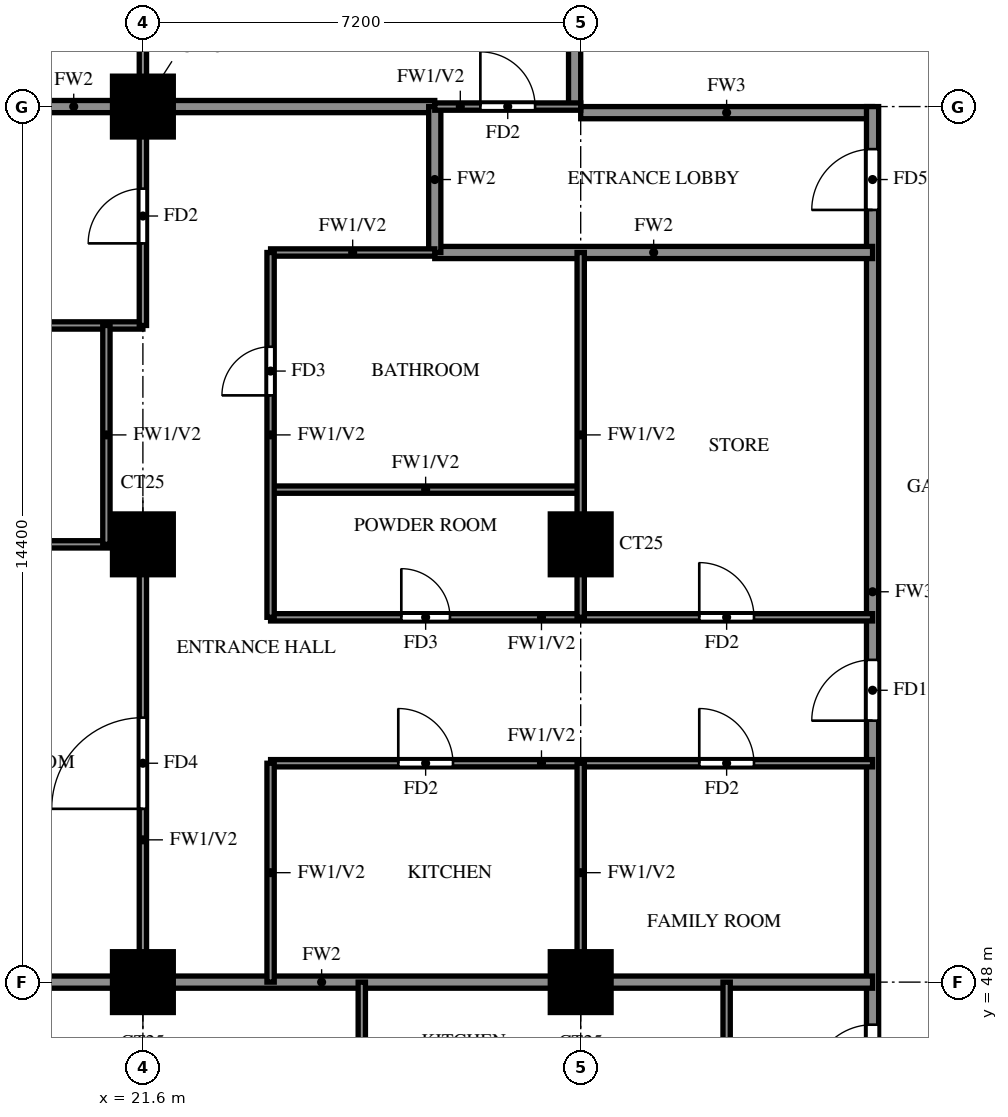
"""IFC4 building model, lengths in metres.
Left out: names, types, materials, properties, quantities, classifications, styles, units other than length and angle.
Written with IfcOpenShell. Run it as: python <this file> out.ifc"""

import sys

from ifc_helpers import new_model, si_unit, direction, frame, frame_2d, origin, origin_2d, place, context, subcontext, project, spatial, rectangle, extrude, source, transform, mapped, element, fill, save


model = new_model("IFC4")
c1 = context("Model", 3, precision=1e-05, world=origin(), true_north=direction((0.0, 1.0)))
c2 = subcontext(c1, "Body", "Model", "MODEL_VIEW")
j1 = project(units=[si_unit("LENGTHUNIT", "METRE"), si_unit("PLANEANGLEUNIT", "RADIAN")], contexts=[c1])
p1 = place(None, origin())
s1 = spatial("IfcSite", under=j1, at=p1, CompositionType="ELEMENT")
p2 = place(p1, origin())
s2 = spatial("IfcBuilding", under=s1, at=p2, CompositionType="ELEMENT")
p3 = place(p2, frame((0.0, 0.0, 150.0)))
s3 = spatial("IfcBuildingStorey", under=s2, at=p3, CompositionType="ELEMENT", Elevation=150.0)
m1 = source(origin(), c2, "Body", "SweptSolid", [
    extrude(rectangle(XDim=1.0, YDim=1.0, at=origin_2d()), origin(), (0.0, 0.0, 1.0), 3.2),
])
for number, where, z_axis, x_axis in (
    (1, (21.6, 48.0, 0.0), (0.0, 0.0, 1.0), (1.0, 0.0, 0.0)),
    (2, (28.8, 48.0, 0.0), (0.0, 0.0, 1.0), (1.0, 0.0, 0.0)),
    (3, (21.6, 55.2, 0.0), (0.0, 0.0, 1.0), (1.0, 0.0, 0.0)),
    (4, (28.8, 55.2, 0.0), (0.0, 0.0, 1.0), (1.0, 0.0, 0.0)),
    (5, (21.6, 62.4, 0.0), (0.0, 0.0, 1.0), (1.0, 0.0, 0.0)),
):
    element("IfcColumn", number, at=place(p3, frame(where, z_axis=z_axis, x_axis=x_axis)), inside=s3, PredefinedType="COLUMN", context=c2, shape_type="MappedRepresentation", body=[
        mapped(m1, transform((0.0, 0.0, 0.0))),
    ])
p4 = place(p3, frame((28.8, 62.3, 0.0), z_axis=(0.0, 0.0, 1.0), x_axis=(1.0, 0.0, 0.0)))
e6 = element("IfcWall", 6, at=p4, inside=s3, PredefinedType="SOLIDWALL", context=c2, shape_type="SweptSolid", body=[
    extrude(rectangle(XDim=4.8, YDim=0.2, at=frame_2d((2.4, 0.0))), origin(), (0.0, 0.0, 1.0), 3.2),
])
p5 = place(p3, frame((28.7, 62.4, 0.0), z_axis=(0.0, 0.0, 1.0), x_axis=(0.0, 1.0, 0.0)))
e7 = element("IfcWall", 7, at=p5, inside=s3, PredefinedType="SOLIDWALL", context=c2, shape_type="SweptSolid", body=[
    extrude(rectangle(XDim=15.6, YDim=0.2, at=frame_2d((7.8, 0.0))), origin(), (0.0, 0.0, 1.0), 3.2),
])
p6 = place(p3, frame((33.6, 45.6, 0.0), z_axis=(0.0, 0.0, 1.0), x_axis=(0.0, 1.0, 0.0)))
e8 = element("IfcWall", 8, at=p6, inside=s3, PredefinedType="SOLIDWALL", context=c2, shape_type="SweptSolid", body=[
    extrude(rectangle(XDim=16.8, YDim=0.2, at=frame_2d((8.4, 0.0))), origin(), (0.0, 0.0, 1.0), 3.2),
])
p7 = place(p6, frame((0.7, 0.0, 0.0)))
e9 = element("IfcOpeningElement", 9, at=p7, cuts=e8, PredefinedType="OPENING", context=c2, shape_type="SweptSolid", body=[
    extrude(rectangle(XDim=1.0, YDim=2.1, at=frame_2d((0.5, 1.05))), frame((0.0, 0.11, 0.0), z_axis=(0.0, -1.0, 0.0), x_axis=(1.0, 0.0, 0.0)), (0.0, 0.0, 1.0), 0.22),
])
p8 = place(p6, frame((6.7, 0.0, 0.0)))
e10 = element("IfcOpeningElement", 10, at=p8, cuts=e8, PredefinedType="OPENING", context=c2, shape_type="SweptSolid", body=[
    extrude(rectangle(XDim=1.0, YDim=2.1, at=frame_2d((0.5, 1.05))), frame((0.0, 0.11, 0.0), z_axis=(0.0, -1.0, 0.0), x_axis=(1.0, 0.0, 0.0)), (0.0, 0.0, 1.0), 0.22),
])
p9 = place(p6, frame((15.1, 0.0, 0.0)))
e11 = element("IfcOpeningElement", 11, at=p9, cuts=e8, PredefinedType="OPENING", context=c2, shape_type="SweptSolid", body=[
    extrude(rectangle(XDim=1.0, YDim=2.1, at=frame_2d((0.5, 1.05))), frame((0.0, 0.11, 0.0), z_axis=(0.0, -1.0, 0.0), x_axis=(1.0, 0.0, 0.0)), (0.0, 0.0, 1.0), 0.22),
])
p10 = place(p3, frame((14.525, 48.0, 0.0), z_axis=(0.0, 0.0, 1.0), x_axis=(1.0, 0.0, 0.0)))
e12 = element("IfcWall", 12, at=p10, inside=s3, PredefinedType="SOLIDWALL", context=c2, shape_type="SweptSolid", body=[
    extrude(rectangle(XDim=19.075, YDim=0.2, at=frame_2d((9.538, 0.0))), origin(), (0.0, 0.0, 1.0), 3.2),
])
p11 = place(p3, frame((26.4, 60.0, 0.0), z_axis=(0.0, 0.0, 1.0), x_axis=(1.0, 0.0, 0.0)))
e13 = element("IfcWall", 13, at=p11, inside=s3, PredefinedType="SOLIDWALL", context=c2, shape_type="SweptSolid", body=[
    extrude(rectangle(XDim=7.2, YDim=0.2, at=frame_2d((3.6, 0.0))), origin(), (0.0, 0.0, 1.0), 3.2),
])
p12 = place(p3, frame((14.525, 62.4, 0.0), z_axis=(0.0, 0.0, 1.0), x_axis=(1.0, 0.0, 0.0)))
e14 = element("IfcWall", 14, at=p12, inside=s3, PredefinedType="SOLIDWALL", context=c2, shape_type="SweptSolid", body=[
    extrude(rectangle(XDim=11.875, YDim=0.2, at=frame_2d((5.938, 0.0))), origin(), (0.0, 0.0, 1.0), 3.2),
])
p13 = place(p3, frame((26.4, 60.0, 0.0), z_axis=(0.0, 0.0, 1.0), x_axis=(0.0, 1.0, 0.0)))
e15 = element("IfcWall", 15, at=p13, inside=s3, PredefinedType="SOLIDWALL", context=c2, shape_type="SweptSolid", body=[
    extrude(rectangle(XDim=2.4, YDim=0.2, at=frame_2d((1.2, 0.0))), origin(), (0.0, 0.0, 1.0), 3.2),
])
p14 = place(p3, frame((23.7, 51.6, 0.0), z_axis=(0.0, 0.0, 1.0), x_axis=(1.0, 0.0, 0.0)))
e16 = element("IfcWall", 16, at=p14, inside=s3, PredefinedType="PARTITIONING", context=c2, shape_type="SweptSolid", body=[
    extrude(rectangle(XDim=9.9, YDim=0.12, at=frame_2d((4.95, 0.0))), origin(), (0.0, 0.0, 1.0), 3.2),
])
p15 = place(p14, frame((2.1, 0.0, 0.0)))
e17 = element("IfcOpeningElement", 17, at=p15, cuts=e16, PredefinedType="OPENING", context=c2, shape_type="SweptSolid", body=[
    extrude(rectangle(XDim=0.9, YDim=2.1, at=frame_2d((0.45, 1.05))), frame((0.0, 0.07, 0.0), z_axis=(0.0, -1.0, 0.0), x_axis=(1.0, 0.0, 0.0)), (0.0, 0.0, 1.0), 0.14),
])
p16 = place(p14, frame((7.05, 0.0, 0.0)))
e18 = element("IfcOpeningElement", 18, at=p16, cuts=e16, PredefinedType="OPENING", context=c2, shape_type="SweptSolid", body=[
    extrude(rectangle(XDim=0.9, YDim=2.1, at=frame_2d((0.45, 1.05))), frame((0.0, 0.07, 0.0), z_axis=(0.0, -1.0, 0.0), x_axis=(1.0, 0.0, 0.0)), (0.0, 0.0, 1.0), 0.14),
])
p17 = place(p3, frame((23.7, 54.0, 0.0), z_axis=(0.0, 0.0, 1.0), x_axis=(1.0, 0.0, 0.0)))
e19 = element("IfcWall", 19, at=p17, inside=s3, PredefinedType="PARTITIONING", context=c2, shape_type="SweptSolid", body=[
    extrude(rectangle(XDim=9.9, YDim=0.12, at=frame_2d((4.95, 0.0))), origin(), (0.0, 0.0, 1.0), 3.2),
])
p18 = place(p17, frame((2.15, 0.0, 0.0)))
e20 = element("IfcOpeningElement", 20, at=p18, cuts=e19, PredefinedType="OPENING", context=c2, shape_type="SweptSolid", body=[
    extrude(rectangle(XDim=0.8, YDim=2.1, at=frame_2d((0.4, 1.05))), frame((0.0, 0.07, 0.0), z_axis=(0.0, -1.0, 0.0), x_axis=(1.0, 0.0, 0.0)), (0.0, 0.0, 1.0), 0.14),
])
p19 = place(p17, frame((7.05, 0.0, 0.0)))
e21 = element("IfcOpeningElement", 21, at=p19, cuts=e19, PredefinedType="OPENING", context=c2, shape_type="SweptSolid", body=[
    extrude(rectangle(XDim=0.9, YDim=2.1, at=frame_2d((0.45, 1.05))), frame((0.0, 0.07, 0.0), z_axis=(0.0, -1.0, 0.0), x_axis=(1.0, 0.0, 0.0)), (0.0, 0.0, 1.0), 0.14),
])
p20 = place(p3, frame((14.525, 55.2, 0.0), z_axis=(0.0, 0.0, 1.0), x_axis=(1.0, 0.0, 0.0)))
e22 = element("IfcWall", 22, at=p20, inside=s3, PredefinedType="PARTITIONING", context=c2, shape_type="SweptSolid", body=[
    extrude(rectangle(XDim=7.075, YDim=0.12, at=frame_2d((3.538, 0.0))), origin(), (0.0, 0.0, 1.0), 3.2),
])
p21 = place(p3, frame((23.7, 56.1, 0.0), z_axis=(0.0, 0.0, 1.0), x_axis=(1.0, 0.0, 0.0)))
e23 = element("IfcWall", 23, at=p21, inside=s3, PredefinedType="PARTITIONING", context=c2, shape_type="SweptSolid", body=[
    extrude(rectangle(XDim=5.1, YDim=0.12, at=frame_2d((2.55, 0.0))), origin(), (0.0, 0.0, 1.0), 3.2),
])
p22 = place(p3, frame((14.525, 58.8, 0.0), z_axis=(0.0, 0.0, 1.0), x_axis=(1.0, 0.0, 0.0)))
e24 = element("IfcWall", 24, at=p22, inside=s3, PredefinedType="PARTITIONING", context=c2, shape_type="SweptSolid", body=[
    extrude(rectangle(XDim=7.075, YDim=0.12, at=frame_2d((3.538, 0.0))), origin(), (0.0, 0.0, 1.0), 2.3),
])
p23 = place(p22, frame((2.837, 0.0, 0.0)))
e25 = element("IfcOpeningElement", 25, at=p23, cuts=e24, PredefinedType="OPENING", context=c2, shape_type="SweptSolid", body=[
    extrude(rectangle(XDim=0.8, YDim=2.1, at=frame_2d((0.4, 1.05))), frame((0.0, 0.07, 0.0), z_axis=(0.0, -1.0, 0.0), x_axis=(1.0, 0.0, 0.0)), (0.0, 0.0, 1.0), 0.14),
])
p24 = place(p3, frame((23.7, 60.0, 0.0), z_axis=(0.0, 0.0, 1.0), x_axis=(1.0, 0.0, 0.0)))
e26 = element("IfcWall", 26, at=p24, inside=s3, PredefinedType="PARTITIONING", context=c2, shape_type="SweptSolid", body=[
    extrude(rectangle(XDim=2.7, YDim=0.12, at=frame_2d((1.35, 0.0))), origin(), (0.0, 0.0, 1.0), 3.2),
])
p25 = place(p3, frame((26.4, 62.4, 0.0), z_axis=(0.0, 0.0, 1.0), x_axis=(1.0, 0.0, 0.0)))
e27 = element("IfcWall", 27, at=p25, inside=s3, PredefinedType="PARTITIONING", context=c2, shape_type="SweptSolid", body=[
    extrude(rectangle(XDim=2.4, YDim=0.12, at=frame_2d((1.2, 0.0))), origin(), (0.0, 0.0, 1.0), 3.2),
])
p26 = place(p25, frame((0.75, 0.0, 0.0)))
e28 = element("IfcOpeningElement", 28, at=p26, cuts=e27, PredefinedType="OPENING", context=c2, shape_type="SweptSolid", body=[
    extrude(rectangle(XDim=0.9, YDim=2.1, at=frame_2d((0.45, 1.05))), frame((0.0, 0.07, 0.0), z_axis=(0.0, -1.0, 0.0), x_axis=(1.0, 0.0, 0.0)), (0.0, 0.0, 1.0), 0.14),
])
p27 = place(p3, frame((21.0, 55.2, 0.0), z_axis=(0.0, 0.0, 1.0), x_axis=(0.0, 1.0, 0.0)))
e29 = element("IfcWall", 29, at=p27, inside=s3, PredefinedType="PARTITIONING", context=c2, shape_type="SweptSolid", body=[
    extrude(rectangle(XDim=3.6, YDim=0.12, at=frame_2d((1.8, 0.0))), origin(), (0.0, 0.0, 1.0), 3.2),
])
p28 = place(p3, frame((21.6, 48.0, 0.0), z_axis=(0.0, 0.0, 1.0), x_axis=(0.0, 1.0, 0.0)))
e30 = element("IfcWall", 30, at=p28, inside=s3, PredefinedType="PARTITIONING", context=c2, shape_type="SweptSolid", body=[
    extrude(rectangle(XDim=7.2, YDim=0.12, at=frame_2d((3.6, 0.0))), origin(), (0.0, 0.0, 1.0), 3.2),
])
p29 = place(p28, frame((2.85, 0.0, 0.0)))
e31 = element("IfcOpeningElement", 31, at=p29, cuts=e30, PredefinedType="OPENING", context=c2, shape_type="SweptSolid", body=[
    extrude(rectangle(XDim=1.5, YDim=2.1, at=frame_2d((0.75, 1.05))), frame((0.0, 0.07, 0.0), z_axis=(0.0, -1.0, 0.0), x_axis=(1.0, 0.0, 0.0)), (0.0, 0.0, 1.0), 0.14),
])
p30 = place(p3, frame((21.6, 58.8, 0.0), z_axis=(0.0, 0.0, 1.0), x_axis=(0.0, 1.0, 0.0)))
e32 = element("IfcWall", 32, at=p30, inside=s3, PredefinedType="PARTITIONING", context=c2, shape_type="SweptSolid", body=[
    extrude(rectangle(XDim=10.8, YDim=0.12, at=frame_2d((5.4, 0.0))), origin(), (0.0, 0.0, 1.0), 3.2),
])
p31 = place(p30, frame((1.35, 0.0, 0.0)))
e33 = element("IfcOpeningElement", 33, at=p31, cuts=e32, PredefinedType="OPENING", context=c2, shape_type="SweptSolid", body=[
    extrude(rectangle(XDim=0.9, YDim=2.1, at=frame_2d((0.45, 1.05))), frame((0.0, 0.07, 0.0), z_axis=(0.0, -1.0, 0.0), x_axis=(1.0, 0.0, 0.0)), (0.0, 0.0, 1.0), 0.14),
])
p32 = place(p30, frame((4.95, 0.0, 0.0)))
e34 = element("IfcOpeningElement", 34, at=p32, cuts=e32, PredefinedType="OPENING", context=c2, shape_type="SweptSolid", body=[
    extrude(rectangle(XDim=0.9, YDim=2.1, at=frame_2d((0.45, 1.05))), frame((0.0, 0.07, 0.0), z_axis=(0.0, -1.0, 0.0), x_axis=(1.0, 0.0, 0.0)), (0.0, 0.0, 1.0), 0.14),
])
p33 = place(p30, frame((8.55, 0.0, 0.0)))
e35 = element("IfcOpeningElement", 35, at=p33, cuts=e32, PredefinedType="OPENING", context=c2, shape_type="SweptSolid", body=[
    extrude(rectangle(XDim=0.9, YDim=2.1, at=frame_2d((0.45, 1.05))), frame((0.0, 0.07, 0.0), z_axis=(0.0, -1.0, 0.0), x_axis=(1.0, 0.0, 0.0)), (0.0, 0.0, 1.0), 0.14),
])
p34 = place(p3, frame((23.7, 48.0, 0.0), z_axis=(0.0, 0.0, 1.0), x_axis=(0.0, 1.0, 0.0)))
e36 = element("IfcWall", 36, at=p34, inside=s3, PredefinedType="PARTITIONING", context=c2, shape_type="SweptSolid", body=[
    extrude(rectangle(XDim=3.6, YDim=0.12, at=frame_2d((1.8, 0.0))), origin(), (0.0, 0.0, 1.0), 3.2),
])
p35 = place(p3, frame((23.7, 54.0, 0.0), z_axis=(0.0, 0.0, 1.0), x_axis=(0.0, 1.0, 0.0)))
e37 = element("IfcWall", 37, at=p35, inside=s3, PredefinedType="PARTITIONING", context=c2, shape_type="SweptSolid", body=[
    extrude(rectangle(XDim=6.0, YDim=0.12, at=frame_2d((3.0, 0.0))), origin(), (0.0, 0.0, 1.0), 3.2),
])
p36 = place(p35, frame((3.65, 0.0, 0.0)))
e38 = element("IfcOpeningElement", 38, at=p36, cuts=e37, PredefinedType="OPENING", context=c2, shape_type="SweptSolid", body=[
    extrude(rectangle(XDim=0.8, YDim=2.1, at=frame_2d((0.4, 1.05))), frame((0.0, 0.07, 0.0), z_axis=(0.0, -1.0, 0.0), x_axis=(1.0, 0.0, 0.0)), (0.0, 0.0, 1.0), 0.14),
])
p37 = place(p3, frame((25.2, 39.725, 0.0), z_axis=(0.0, 0.0, 1.0), x_axis=(0.0, 1.0, 0.0)))
e39 = element("IfcWall", 39, at=p37, inside=s3, PredefinedType="PARTITIONING", context=c2, shape_type="SweptSolid", body=[
    extrude(rectangle(XDim=8.275, YDim=0.12, at=frame_2d((4.137, 0.0))), origin(), (0.0, 0.0, 1.0), 3.2),
])
p38 = place(p37, frame((4.525, 0.0, 0.0)))
e40 = element("IfcOpeningElement", 40, at=p38, cuts=e39, PredefinedType="OPENING", context=c2, shape_type="SweptSolid", body=[
    extrude(rectangle(XDim=0.9, YDim=2.1, at=frame_2d((0.45, 1.05))), frame((0.0, 0.07, 0.0), z_axis=(0.0, -1.0, 0.0), x_axis=(1.0, 0.0, 0.0)), (0.0, 0.0, 1.0), 0.14),
])
p39 = place(p3, frame((28.8, 48.0, 0.0), z_axis=(0.0, 0.0, 1.0), x_axis=(0.0, 1.0, 0.0)))
e41 = element("IfcWall", 41, at=p39, inside=s3, PredefinedType="PARTITIONING", context=c2, shape_type="SweptSolid", body=[
    extrude(rectangle(XDim=3.6, YDim=0.12, at=frame_2d((1.8, 0.0))), origin(), (0.0, 0.0, 1.0), 3.2),
])
p40 = place(p3, frame((28.8, 54.0, 0.0), z_axis=(0.0, 0.0, 1.0), x_axis=(0.0, 1.0, 0.0)))
e42 = element("IfcWall", 42, at=p40, inside=s3, PredefinedType="PARTITIONING", context=c2, shape_type="SweptSolid", body=[
    extrude(rectangle(XDim=6.0, YDim=0.12, at=frame_2d((3.0, 0.0))), origin(), (0.0, 0.0, 1.0), 3.2),
])
p41 = place(p3, frame((31.2, 45.6, 0.0), z_axis=(0.0, 0.0, 1.0), x_axis=(0.0, 1.0, 0.0)))
e43 = element("IfcWall", 43, at=p41, inside=s3, PredefinedType="PARTITIONING", context=c2, shape_type="SweptSolid", body=[
    extrude(rectangle(XDim=2.4, YDim=0.12, at=frame_2d((1.2, 0.0))), origin(), (0.0, 0.0, 1.0), 3.2),
])
p42 = place(p7, origin())
e44 = element("IfcDoor", 44, at=p42, inside=s3, OperationType="SINGLE_SWING_RIGHT", PredefinedType="DOOR", context=c2, shape_type="SweptSolid", body=[
    extrude(rectangle(XDim=1.0, YDim=2.1, at=frame_2d((0.5, 1.05))), frame((0.0, 0.025, 0.0), z_axis=(0.0, -1.0, 0.0), x_axis=(1.0, 0.0, 0.0)), (0.0, 0.0, 1.0), 0.05),
])
fill(e9, e44)
p43 = place(p8, origin())
e45 = element("IfcDoor", 45, at=p43, inside=s3, OperationType="SINGLE_SWING_RIGHT", PredefinedType="DOOR", context=c2, shape_type="SweptSolid", body=[
    extrude(rectangle(XDim=1.0, YDim=2.1, at=frame_2d((0.5, 1.05))), frame((0.0, 0.025, 0.0), z_axis=(0.0, -1.0, 0.0), x_axis=(1.0, 0.0, 0.0)), (0.0, 0.0, 1.0), 0.05),
])
fill(e10, e45)
p44 = place(p29, origin())
e46 = element("IfcDoor", 46, at=p44, inside=s3, OperationType="SINGLE_SWING_LEFT", PredefinedType="DOOR", context=c2, shape_type="SweptSolid", body=[
    extrude(rectangle(XDim=1.5, YDim=2.1, at=frame_2d((0.75, 1.05))), frame((0.0, 0.025, 0.0), z_axis=(0.0, -1.0, 0.0), x_axis=(1.0, 0.0, 0.0)), (0.0, 0.0, 1.0), 0.05),
])
fill(e31, e46)
p45 = place(p31, origin())
e47 = element("IfcDoor", 47, at=p45, inside=s3, OperationType="SINGLE_SWING_LEFT", PredefinedType="DOOR", context=c2, shape_type="SweptSolid", body=[
    extrude(rectangle(XDim=0.9, YDim=2.1, at=frame_2d((0.45, 1.05))), frame((0.0, 0.025, 0.0), z_axis=(0.0, -1.0, 0.0), x_axis=(1.0, 0.0, 0.0)), (0.0, 0.0, 1.0), 0.05),
])
fill(e33, e47)
p46 = place(p15, origin())
e48 = element("IfcDoor", 48, at=p46, inside=s3, OperationType="SINGLE_SWING_LEFT", PredefinedType="DOOR", context=c2, shape_type="SweptSolid", body=[
    extrude(rectangle(XDim=0.9, YDim=2.1, at=frame_2d((0.45, 1.05))), frame((0.0, 0.025, 0.0), z_axis=(0.0, -1.0, 0.0), x_axis=(1.0, 0.0, 0.0)), (0.0, 0.0, 1.0), 0.05),
])
fill(e17, e48)
p47 = place(p18, origin())
e49 = element("IfcDoor", 49, at=p47, inside=s3, OperationType="SINGLE_SWING_LEFT", PredefinedType="DOOR", context=c2, shape_type="SweptSolid", body=[
    extrude(rectangle(XDim=0.8, YDim=2.1, at=frame_2d((0.4, 1.05))), frame((0.0, 0.025, 0.0), z_axis=(0.0, -1.0, 0.0), x_axis=(1.0, 0.0, 0.0)), (0.0, 0.0, 1.0), 0.05),
])
fill(e20, e49)
p48 = place(p36, origin())
e50 = element("IfcDoor", 50, at=p48, inside=s3, OperationType="SINGLE_SWING_RIGHT", PredefinedType="DOOR", context=c2, shape_type="SweptSolid", body=[
    extrude(rectangle(XDim=0.8, YDim=2.1, at=frame_2d((0.4, 1.05))), frame((0.0, 0.025, 0.0), z_axis=(0.0, -1.0, 0.0), x_axis=(1.0, 0.0, 0.0)), (0.0, 0.0, 1.0), 0.05),
])
fill(e38, e50)
p49 = place(p16, origin())
e51 = element("IfcDoor", 51, at=p49, inside=s3, OperationType="SINGLE_SWING_LEFT", PredefinedType="DOOR", context=c2, shape_type="SweptSolid", body=[
    extrude(rectangle(XDim=0.9, YDim=2.1, at=frame_2d((0.45, 1.05))), frame((0.0, 0.025, 0.0), z_axis=(0.0, -1.0, 0.0), x_axis=(1.0, 0.0, 0.0)), (0.0, 0.0, 1.0), 0.05),
])
fill(e18, e51)
p50 = place(p19, origin())
e52 = element("IfcDoor", 52, at=p50, inside=s3, OperationType="SINGLE_SWING_LEFT", PredefinedType="DOOR", context=c2, shape_type="SweptSolid", body=[
    extrude(rectangle(XDim=0.9, YDim=2.1, at=frame_2d((0.45, 1.05))), frame((0.0, 0.025, 0.0), z_axis=(0.0, -1.0, 0.0), x_axis=(1.0, 0.0, 0.0)), (0.0, 0.0, 1.0), 0.05),
])
fill(e21, e52)
p51 = place(p26, origin())
e53 = element("IfcDoor", 53, at=p51, inside=s3, OperationType="SINGLE_SWING_RIGHT", PredefinedType="DOOR", context=c2, shape_type="SweptSolid", body=[
    extrude(rectangle(XDim=0.9, YDim=2.1, at=frame_2d((0.45, 1.05))), frame((0.0, 0.025, 0.0), z_axis=(0.0, -1.0, 0.0), x_axis=(1.0, 0.0, 0.0)), (0.0, 0.0, 1.0), 0.05),
])
fill(e28, e53)
p52 = place(p9, origin())
e54 = element("IfcDoor", 54, at=p52, inside=s3, OperationType="SINGLE_SWING_LEFT", PredefinedType="DOOR", context=c2, shape_type="SweptSolid", body=[
    extrude(rectangle(XDim=1.0, YDim=2.1, at=frame_2d((0.5, 1.05))), frame((0.0, 0.025, 0.0), z_axis=(0.0, -1.0, 0.0), x_axis=(1.0, 0.0, 0.0)), (0.0, 0.0, 1.0), 0.05),
])
fill(e11, e54)
save(model, sys.argv[1])
